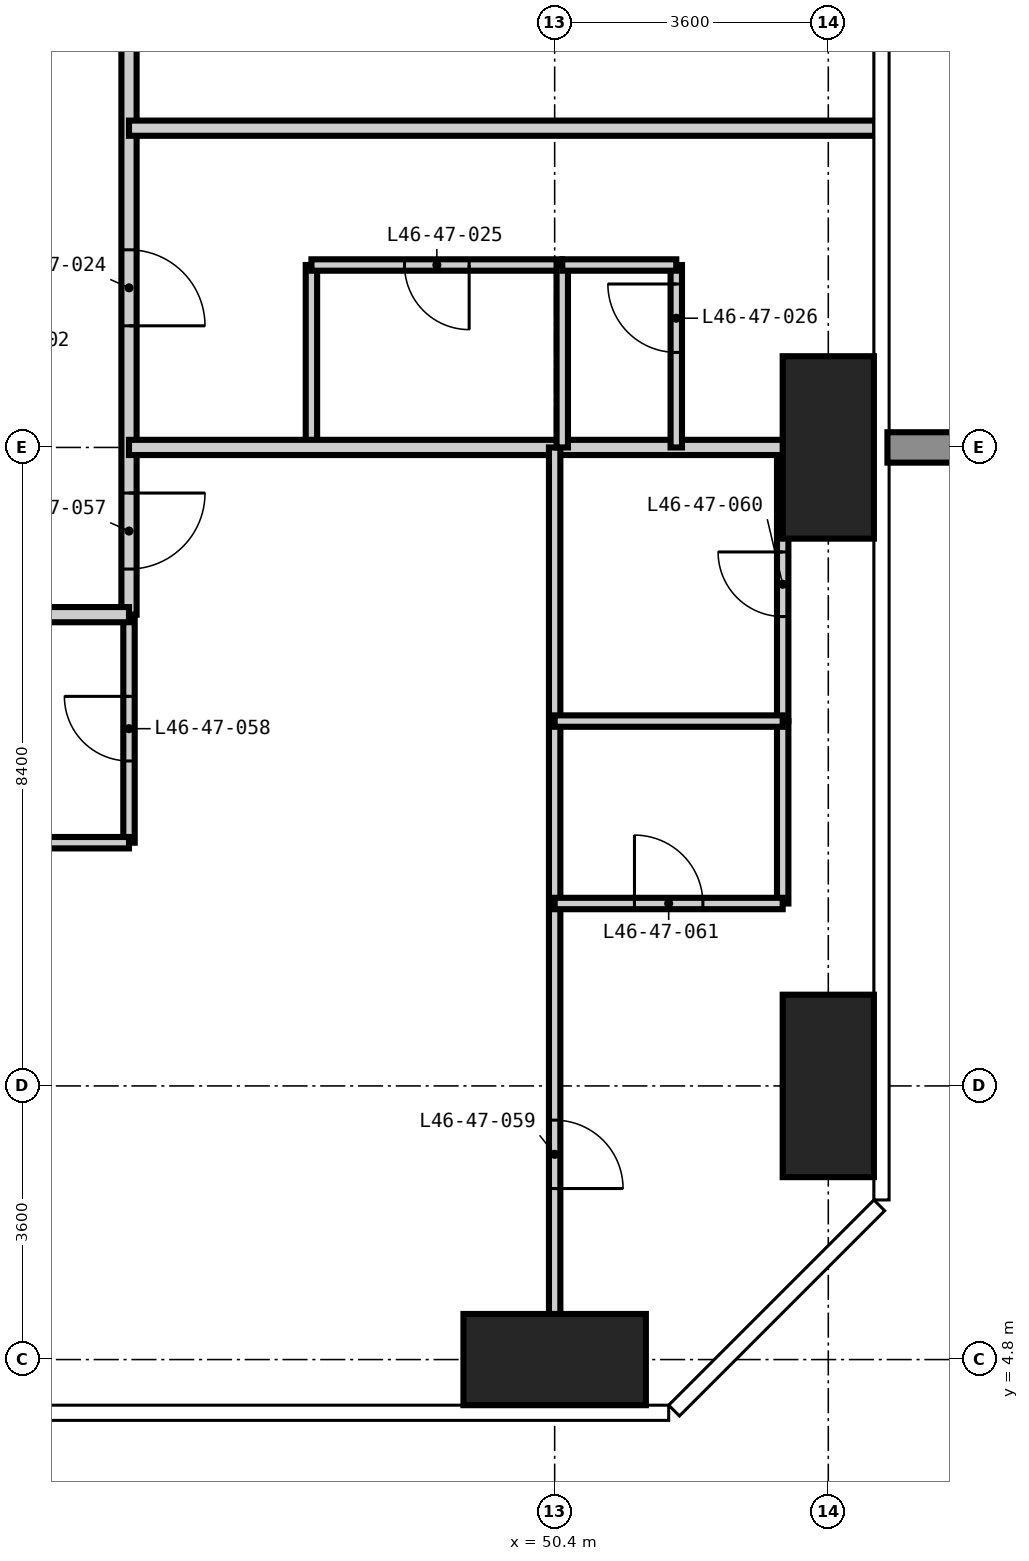
"""IFC4 building model, lengths in metres.
Left out: names, types, materials, properties, quantities, classifications, styles, units other than length and angle.
Written with IfcOpenShell. Run it as: python <this file> out.ifc"""

import sys

from ifc_helpers import new_model, si_unit, direction, frame, frame_2d, origin, origin_2d, place, context, subcontext, project, spatial, rectangle, extrude, element, fill, save


model = new_model("IFC4")
c1 = context("Model", 3, precision=1e-05, world=origin(), true_north=direction((0.0, 1.0)))
c2 = subcontext(c1, "Body", "Model", "MODEL_VIEW")
j1 = project(units=[si_unit("LENGTHUNIT", "METRE"), si_unit("PLANEANGLEUNIT", "RADIAN")], contexts=[c1])
p1 = place(None, origin())
s1 = spatial("IfcSite", under=j1, at=p1, CompositionType="ELEMENT")
p2 = place(p1, origin())
s2 = spatial("IfcBuilding", under=s1, at=p2, CompositionType="ELEMENT")
p3 = place(p2, frame((0.0, 0.0, 180.6)))
s3 = spatial("IfcBuildingStorey", under=s2, at=p3, CompositionType="ELEMENT", Elevation=180.6)
p4 = place(p3, frame((50.4, 4.8, -0.35), z_axis=(0.0, 0.0, 1.0), x_axis=(1.0, 0.0, 0.0)))
e1 = element("IfcColumn", 1, at=p4, inside=s3, PredefinedType="COLUMN", context=c2, shape_type="SweptSolid", body=[
    extrude(rectangle(XDim=2.4, YDim=1.2, at=origin_2d()), origin(), (0.0, 0.0, 1.0), 3.6),
])
for number, where, z_axis, x_axis in (
    (2, (54.0, 8.4, -0.35), (0.0, 0.0, 1.0), (1.0, 0.0, 0.0)),
    (3, (54.0, 16.8, -0.35), (0.0, 0.0, 1.0), (1.0, 0.0, 0.0)),
):
    element("IfcColumn", number, at=place(p3, frame(where, z_axis=z_axis, x_axis=x_axis)), inside=s3, PredefinedType="COLUMN", context=c2, shape_type="SweptSolid", body=[
        extrude(rectangle(XDim=1.2, YDim=2.4, at=origin_2d()), origin(), (0.0, 0.0, 1.0), 3.6),
    ])
p5 = place(p3, frame((44.8, 11.6, 0.0), z_axis=(0.0, 0.0, 1.0), x_axis=(0.0, 1.0, 0.0)))
e4 = element("IfcWall", 4, at=p5, inside=s3, PredefinedType="PARTITIONING", context=c2, shape_type="SweptSolid", body=[
    extrude(rectangle(XDim=3.0, YDim=0.15, at=frame_2d((1.5, 0.0))), origin(), (0.0, 0.0, 1.0), 3.25),
])
p6 = place(p5, frame((1.075, 0.0, 0.0)))
e5 = element("IfcOpeningElement", 5, at=p6, cuts=e4, PredefinedType="OPENING", context=c2, shape_type="SweptSolid", body=[
    extrude(rectangle(XDim=0.85, YDim=2.1, at=frame_2d((0.425, 1.05))), frame((0.0, 0.085, 0.0), z_axis=(0.0, -1.0, 0.0), x_axis=(1.0, 0.0, 0.0)), (0.0, 0.0, 1.0), 0.17),
])
p7 = place(p3, frame((47.2, 16.8, 0.0), z_axis=(0.0, 0.0, 1.0), x_axis=(0.0, 1.0, 0.0)))
e6 = element("IfcWall", 6, at=p7, inside=s3, PredefinedType="PARTITIONING", context=c2, shape_type="SweptSolid", body=[
    extrude(rectangle(XDim=2.4, YDim=0.15, at=frame_2d((1.2, 0.0))), origin(), (0.0, 0.0, 1.0), 3.25),
])
p8 = place(p3, frame((53.4, 13.2, 0.0), z_axis=(0.0, 0.0, 1.0), x_axis=(0.0, 1.0, 0.0)))
e7 = element("IfcWall", 7, at=p8, inside=s3, PredefinedType="PARTITIONING", context=c2, shape_type="SweptSolid", body=[
    extrude(rectangle(XDim=3.6, YDim=0.15, at=frame_2d((1.8, 0.0))), origin(), (0.0, 0.0, 1.0), 3.25),
])
p9 = place(p8, frame((1.375, 0.0, 0.0)))
e8 = element("IfcOpeningElement", 8, at=p9, cuts=e7, PredefinedType="OPENING", context=c2, shape_type="SweptSolid", body=[
    extrude(rectangle(XDim=0.85, YDim=2.1, at=frame_2d((0.425, 1.05))), frame((0.0, 0.085, 0.0), z_axis=(0.0, -1.0, 0.0), x_axis=(1.0, 0.0, 0.0)), (0.0, 0.0, 1.0), 0.17),
])
p10 = place(p3, frame((42.0, 11.6, 0.0), z_axis=(0.0, 0.0, 1.0), x_axis=(1.0, 0.0, 0.0)))
e9 = element("IfcWall", 9, at=p10, inside=s3, PredefinedType="PARTITIONING", context=c2, shape_type="SweptSolid", body=[
    extrude(rectangle(XDim=2.8, YDim=0.15, at=frame_2d((1.4, 0.0))), origin(), (0.0, 0.0, 1.0), 3.25),
])
p11 = place(p3, frame((47.2, 19.2, 0.0), z_axis=(0.0, 0.0, 1.0), x_axis=(1.0, 0.0, 0.0)))
e10 = element("IfcWall", 10, at=p11, inside=s3, PredefinedType="PARTITIONING", context=c2, shape_type="SweptSolid", body=[
    extrude(rectangle(XDim=3.3, YDim=0.15, at=frame_2d((1.65, 0.0))), origin(), (0.0, 0.0, 1.0), 3.25),
])
p12 = place(p11, frame((1.225, 0.0, 0.0)))
e11 = element("IfcOpeningElement", 11, at=p12, cuts=e10, PredefinedType="OPENING", context=c2, shape_type="SweptSolid", body=[
    extrude(rectangle(XDim=0.85, YDim=2.1, at=frame_2d((0.425, 1.05))), frame((0.0, 0.085, 0.0), z_axis=(0.0, -1.0, 0.0), x_axis=(1.0, 0.0, 0.0)), (0.0, 0.0, 1.0), 0.17),
])
p13 = place(p3, frame((44.8, 45.4, 0.0), z_axis=(0.0, 0.0, 1.0), x_axis=(0.0, -1.0, 0.0)))
e12 = element("IfcWall", 12, at=p13, inside=s3, PredefinedType="PARTITIONING", context=c2, shape_type="SweptSolid", body=[
    extrude(rectangle(XDim=30.8, YDim=0.2, at=frame_2d((15.4, 0.0))), origin(), (0.0, 0.0, 1.0), 3.25),
])
p14 = place(p13, frame((26.0, 0.0, 0.0)))
e13 = element("IfcOpeningElement", 13, at=p14, cuts=e12, PredefinedType="OPENING", context=c2, shape_type="SweptSolid", body=[
    extrude(rectangle(XDim=1.0, YDim=2.2, at=frame_2d((0.5, 1.1))), frame((0.0, 0.11, 0.0), z_axis=(0.0, -1.0, 0.0), x_axis=(1.0, 0.0, 0.0)), (0.0, 0.0, 1.0), 0.22),
])
p15 = place(p13, frame((21.8, 0.0, 0.0)))
e14 = element("IfcOpeningElement", 14, at=p15, cuts=e12, PredefinedType="OPENING", context=c2, shape_type="SweptSolid", body=[
    extrude(rectangle(XDim=1.0, YDim=2.2, at=frame_2d((0.5, 1.1))), frame((0.0, 0.11, 0.0), z_axis=(0.0, -1.0, 0.0), x_axis=(1.0, 0.0, 0.0)), (0.0, 0.0, 1.0), 0.22),
])
p16 = place(p13, frame((17.6, 0.0, 0.0)))
e15 = element("IfcOpeningElement", 15, at=p16, cuts=e12, PredefinedType="OPENING", context=c2, shape_type="SweptSolid", body=[
    extrude(rectangle(XDim=1.0, YDim=2.2, at=frame_2d((0.5, 1.1))), frame((0.0, 0.11, 0.0), z_axis=(0.0, -1.0, 0.0), x_axis=(1.0, 0.0, 0.0)), (0.0, 0.0, 1.0), 0.22),
])
p17 = place(p13, frame((13.4, 0.0, 0.0)))
e16 = element("IfcOpeningElement", 16, at=p17, cuts=e12, PredefinedType="OPENING", context=c2, shape_type="SweptSolid", body=[
    extrude(rectangle(XDim=1.0, YDim=2.2, at=frame_2d((0.5, 1.1))), frame((0.0, 0.11, 0.0), z_axis=(0.0, -1.0, 0.0), x_axis=(1.0, 0.0, 0.0)), (0.0, 0.0, 1.0), 0.22),
])
p18 = place(p13, frame((9.2, 0.0, 0.0)))
e17 = element("IfcOpeningElement", 17, at=p18, cuts=e12, PredefinedType="OPENING", context=c2, shape_type="SweptSolid", body=[
    extrude(rectangle(XDim=1.0, YDim=2.2, at=frame_2d((0.5, 1.1))), frame((0.0, 0.11, 0.0), z_axis=(0.0, -1.0, 0.0), x_axis=(1.0, 0.0, 0.0)), (0.0, 0.0, 1.0), 0.22),
])
p19 = place(p13, frame((5.0, 0.0, 0.0)))
e18 = element("IfcOpeningElement", 18, at=p19, cuts=e12, PredefinedType="OPENING", context=c2, shape_type="SweptSolid", body=[
    extrude(rectangle(XDim=1.0, YDim=2.2, at=frame_2d((0.5, 1.1))), frame((0.0, 0.11, 0.0), z_axis=(0.0, -1.0, 0.0), x_axis=(1.0, 0.0, 0.0)), (0.0, 0.0, 1.0), 0.22),
])
p20 = place(p13, frame((29.2, 0.0, 0.0)))
e19 = element("IfcOpeningElement", 19, at=p20, cuts=e12, PredefinedType="OPENING", context=c2, shape_type="SweptSolid", body=[
    extrude(rectangle(XDim=1.0, YDim=2.2, at=frame_2d((0.5, 1.1))), frame((0.0, 0.11, 0.0), z_axis=(0.0, -1.0, 0.0), x_axis=(1.0, 0.0, 0.0)), (0.0, 0.0, 1.0), 0.22),
])
p21 = place(p13, frame((1.2, 0.0, 0.0)))
e20 = element("IfcOpeningElement", 20, at=p21, cuts=e12, PredefinedType="OPENING", context=c2, shape_type="SweptSolid", body=[
    extrude(rectangle(XDim=1.0, YDim=2.2, at=frame_2d((0.5, 1.1))), frame((0.0, 0.11, 0.0), z_axis=(0.0, -1.0, 0.0), x_axis=(1.0, 0.0, 0.0)), (0.0, 0.0, 1.0), 0.22),
])
p22 = place(p3, frame((44.8, 14.6, 0.0), z_axis=(0.0, 0.0, 1.0), x_axis=(-1.0, 0.0, 0.0)))
e21 = element("IfcWall", 21, at=p22, inside=s3, PredefinedType="PARTITIONING", context=c2, shape_type="SweptSolid", body=[
    extrude(rectangle(XDim=30.2, YDim=0.2, at=frame_2d((15.1, 0.0))), origin(), (0.0, 0.0, 1.0), 3.25),
])
p23 = place(p22, frame((24.5, 0.0, 0.0)))
e22 = element("IfcOpeningElement", 22, at=p23, cuts=e21, PredefinedType="OPENING", context=c2, shape_type="SweptSolid", body=[
    extrude(rectangle(XDim=1.0, YDim=2.2, at=frame_2d((0.5, 1.1))), frame((0.0, 0.11, 0.0), z_axis=(0.0, -1.0, 0.0), x_axis=(1.0, 0.0, 0.0)), (0.0, 0.0, 1.0), 0.22),
])
p24 = place(p22, frame((13.7, 0.0, 0.0)))
e23 = element("IfcOpeningElement", 23, at=p24, cuts=e21, PredefinedType="OPENING", context=c2, shape_type="SweptSolid", body=[
    extrude(rectangle(XDim=1.0, YDim=2.2, at=frame_2d((0.5, 1.1))), frame((0.0, 0.11, 0.0), z_axis=(0.0, -1.0, 0.0), x_axis=(1.0, 0.0, 0.0)), (0.0, 0.0, 1.0), 0.22),
])
p25 = place(p22, frame((7.7, 0.0, 0.0)))
e24 = element("IfcOpeningElement", 24, at=p25, cuts=e21, PredefinedType="OPENING", context=c2, shape_type="SweptSolid", body=[
    extrude(rectangle(XDim=1.0, YDim=2.2, at=frame_2d((0.5, 1.1))), frame((0.0, 0.11, 0.0), z_axis=(0.0, -1.0, 0.0), x_axis=(1.0, 0.0, 0.0)), (0.0, 0.0, 1.0), 0.22),
])
for number, where, z_axis, x_axis in (
    (25, (44.8, 16.8, 0.0), (0.0, 0.0, 1.0), (1.0, 0.0, 0.0)),
    (26, (44.8, 21.0, 0.0), (0.0, 0.0, 1.0), (1.0, 0.0, 0.0)),
):
    element("IfcWall", number, at=place(p3, frame(where, z_axis=z_axis, x_axis=x_axis)), inside=s3, PredefinedType="PARTITIONING", context=c2, shape_type="SweptSolid", body=[
        extrude(rectangle(XDim=9.818, YDim=0.2, at=frame_2d((4.909, 0.0))), origin(), (0.0, 0.0, 1.0), 3.25),
    ])
p26 = place(p3, frame((50.4, 4.182, 0.0), z_axis=(0.0, 0.0, 1.0), x_axis=(0.0, 1.0, 0.0)))
e27 = element("IfcWall", 27, at=p26, inside=s3, PredefinedType="PARTITIONING", context=c2, shape_type="SweptSolid", body=[
    extrude(rectangle(XDim=12.618, YDim=0.15, at=frame_2d((6.309, 0.0))), origin(), (0.0, 0.0, 1.0), 3.25),
])
p27 = place(p26, frame((2.868, 0.0, 0.0)))
e28 = element("IfcOpeningElement", 28, at=p27, cuts=e27, PredefinedType="OPENING", context=c2, shape_type="SweptSolid", body=[
    extrude(rectangle(XDim=0.9, YDim=2.1, at=frame_2d((0.45, 1.05))), frame((0.0, 0.085, 0.0), z_axis=(0.0, -1.0, 0.0), x_axis=(1.0, 0.0, 0.0)), (0.0, 0.0, 1.0), 0.17),
])
p28 = place(p3, frame((50.5, 16.8, 0.0), z_axis=(0.0, 0.0, 1.0), x_axis=(0.0, 1.0, 0.0)))
e29 = element("IfcWall", 29, at=p28, inside=s3, PredefinedType="PARTITIONING", context=c2, shape_type="SweptSolid", body=[
    extrude(rectangle(XDim=2.4, YDim=0.15, at=frame_2d((1.2, 0.0))), origin(), (0.0, 0.0, 1.0), 3.25),
])
p29 = place(p3, frame((52.0, 16.8, 0.0), z_axis=(0.0, 0.0, 1.0), x_axis=(0.0, 1.0, 0.0)))
e30 = element("IfcWall", 30, at=p29, inside=s3, PredefinedType="PARTITIONING", context=c2, shape_type="SweptSolid", body=[
    extrude(rectangle(XDim=2.4, YDim=0.15, at=frame_2d((1.2, 0.0))), origin(), (0.0, 0.0, 1.0), 3.25),
])
p30 = place(p29, frame((1.25, 0.0, 0.0)))
e31 = element("IfcOpeningElement", 31, at=p30, cuts=e30, PredefinedType="OPENING", context=c2, shape_type="SweptSolid", body=[
    extrude(rectangle(XDim=0.9, YDim=2.1, at=frame_2d((0.45, 1.05))), frame((0.0, 0.085, 0.0), z_axis=(0.0, -1.0, 0.0), x_axis=(1.0, 0.0, 0.0)), (0.0, 0.0, 1.0), 0.17),
])
p31 = place(p3, frame((53.4, 10.8, 0.0), z_axis=(0.0, 0.0, 1.0), x_axis=(0.0, 1.0, 0.0)))
e32 = element("IfcWall", 32, at=p31, inside=s3, PredefinedType="PARTITIONING", context=c2, shape_type="SweptSolid", body=[
    extrude(rectangle(XDim=2.4, YDim=0.15, at=frame_2d((1.2, 0.0))), origin(), (0.0, 0.0, 1.0), 3.25),
])
p32 = place(p3, frame((50.4, 10.8, 0.0), z_axis=(0.0, 0.0, 1.0), x_axis=(1.0, 0.0, 0.0)))
e33 = element("IfcWall", 33, at=p32, inside=s3, PredefinedType="PARTITIONING", context=c2, shape_type="SweptSolid", body=[
    extrude(rectangle(XDim=3.0, YDim=0.15, at=frame_2d((1.5, 0.0))), origin(), (0.0, 0.0, 1.0), 3.25),
])
p33 = place(p32, frame((1.05, 0.0, 0.0)))
e34 = element("IfcOpeningElement", 34, at=p33, cuts=e33, PredefinedType="OPENING", context=c2, shape_type="SweptSolid", body=[
    extrude(rectangle(XDim=0.9, YDim=2.1, at=frame_2d((0.45, 1.05))), frame((0.0, 0.085, 0.0), z_axis=(0.0, -1.0, 0.0), x_axis=(1.0, 0.0, 0.0)), (0.0, 0.0, 1.0), 0.17),
])
p34 = place(p3, frame((50.4, 13.2, 0.0), z_axis=(0.0, 0.0, 1.0), x_axis=(1.0, 0.0, 0.0)))
e35 = element("IfcWall", 35, at=p34, inside=s3, PredefinedType="PARTITIONING", context=c2, shape_type="SweptSolid", body=[
    extrude(rectangle(XDim=3.0, YDim=0.15, at=frame_2d((1.5, 0.0))), origin(), (0.0, 0.0, 1.0), 3.25),
])
p35 = place(p3, frame((50.5, 19.2, 0.0), z_axis=(0.0, 0.0, 1.0), x_axis=(1.0, 0.0, 0.0)))
e36 = element("IfcWall", 36, at=p35, inside=s3, PredefinedType="PARTITIONING", context=c2, shape_type="SweptSolid", body=[
    extrude(rectangle(XDim=1.5, YDim=0.15, at=frame_2d((0.75, 0.0))), origin(), (0.0, 0.0, 1.0), 3.25),
])
p36 = place(p14, origin())
e37 = element("IfcDoor", 37, at=p36, inside=s3, OperationType="SINGLE_SWING_RIGHT", PredefinedType="DOOR", context=c2, shape_type="SweptSolid", body=[
    extrude(rectangle(XDim=1.0, YDim=2.2, at=frame_2d((0.5, 1.1))), frame((0.0, 0.025, 0.0), z_axis=(0.0, -1.0, 0.0), x_axis=(1.0, 0.0, 0.0)), (0.0, 0.0, 1.0), 0.05),
])
fill(e13, e37)
p37 = place(p12, frame((0.85, 0.0, 0.0), z_axis=(0.0, 0.0, 1.0), x_axis=(-1.0, 0.0, 0.0)))
e38 = element("IfcDoor", 38, at=p37, inside=s3, OperationType="SINGLE_SWING_LEFT", PredefinedType="DOOR", context=c2, shape_type="SweptSolid", body=[
    extrude(rectangle(XDim=0.85, YDim=2.1, at=frame_2d((0.425, 1.05))), frame((0.0, 0.025, 0.0), z_axis=(0.0, -1.0, 0.0), x_axis=(1.0, 0.0, 0.0)), (0.0, 0.0, 1.0), 0.05),
])
fill(e11, e38)
p38 = place(p30, origin())
e39 = element("IfcDoor", 39, at=p38, inside=s3, OperationType="SINGLE_SWING_RIGHT", PredefinedType="DOOR", context=c2, shape_type="SweptSolid", body=[
    extrude(rectangle(XDim=0.9, YDim=2.1, at=frame_2d((0.45, 1.05))), frame((0.0, 0.025, 0.0), z_axis=(0.0, -1.0, 0.0), x_axis=(1.0, 0.0, 0.0)), (0.0, 0.0, 1.0), 0.05),
])
fill(e31, e39)
p39 = place(p20, origin())
e40 = element("IfcDoor", 40, at=p39, inside=s3, OperationType="SINGLE_SWING_LEFT", PredefinedType="DOOR", context=c2, shape_type="SweptSolid", body=[
    extrude(rectangle(XDim=1.0, YDim=2.2, at=frame_2d((0.5, 1.1))), frame((0.0, 0.025, 0.0), z_axis=(0.0, -1.0, 0.0), x_axis=(1.0, 0.0, 0.0)), (0.0, 0.0, 1.0), 0.05),
])
fill(e19, e40)
p40 = place(p6, origin())
e41 = element("IfcDoor", 41, at=p40, inside=s3, OperationType="SINGLE_SWING_RIGHT", PredefinedType="DOOR", context=c2, shape_type="SweptSolid", body=[
    extrude(rectangle(XDim=0.85, YDim=2.1, at=frame_2d((0.425, 1.05))), frame((0.0, 0.025, 0.0), z_axis=(0.0, -1.0, 0.0), x_axis=(1.0, 0.0, 0.0)), (0.0, 0.0, 1.0), 0.05),
])
fill(e5, e41)
p41 = place(p27, frame((0.9, 0.0, 0.0), z_axis=(0.0, 0.0, 1.0), x_axis=(-1.0, 0.0, 0.0)))
e42 = element("IfcDoor", 42, at=p41, inside=s3, OperationType="SINGLE_SWING_RIGHT", PredefinedType="DOOR", context=c2, shape_type="SweptSolid", body=[
    extrude(rectangle(XDim=0.9, YDim=2.1, at=frame_2d((0.45, 1.05))), frame((0.0, 0.025, 0.0), z_axis=(0.0, -1.0, 0.0), x_axis=(1.0, 0.0, 0.0)), (0.0, 0.0, 1.0), 0.05),
])
fill(e28, e42)
p42 = place(p9, origin())
e43 = element("IfcDoor", 43, at=p42, inside=s3, OperationType="SINGLE_SWING_RIGHT", PredefinedType="DOOR", context=c2, shape_type="SweptSolid", body=[
    extrude(rectangle(XDim=0.85, YDim=2.1, at=frame_2d((0.425, 1.05))), frame((0.0, 0.025, 0.0), z_axis=(0.0, -1.0, 0.0), x_axis=(1.0, 0.0, 0.0)), (0.0, 0.0, 1.0), 0.05),
])
fill(e8, e43)
p43 = place(p33, origin())
e44 = element("IfcDoor", 44, at=p43, inside=s3, OperationType="SINGLE_SWING_LEFT", PredefinedType="DOOR", context=c2, shape_type="SweptSolid", body=[
    extrude(rectangle(XDim=0.9, YDim=2.1, at=frame_2d((0.45, 1.05))), frame((0.0, 0.025, 0.0), z_axis=(0.0, -1.0, 0.0), x_axis=(1.0, 0.0, 0.0)), (0.0, 0.0, 1.0), 0.05),
])
fill(e34, e44)
save(model, sys.argv[1])
